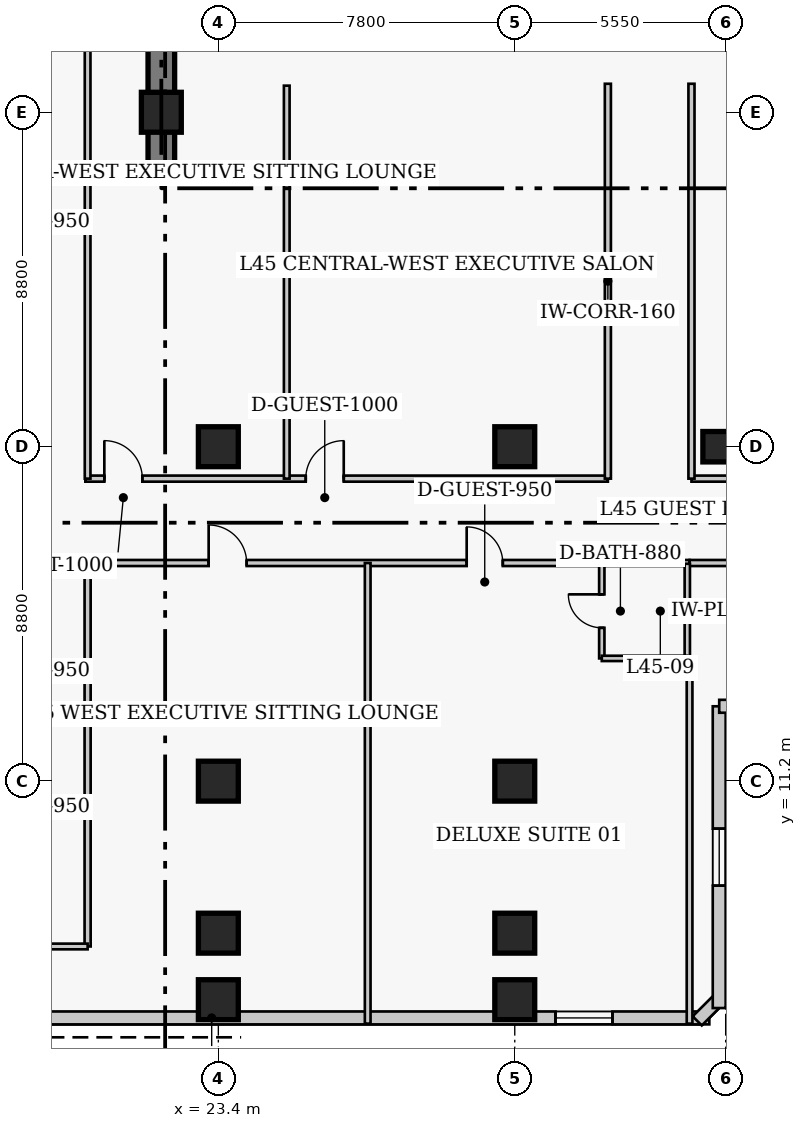
"""IFC4 building model, lengths in metres.
Left out: names, types, materials, properties, quantities, classifications, styles, units other than length and angle.
Written with IfcOpenShell. Run it as: python <this file> out.ifc"""

import sys

from ifc_helpers import new_model, si_unit, direction, frame, frame_2d, origin, origin_2d, place, context, subcontext, project, spatial, rectangle, extrude, element, fill, save


model = new_model("IFC4")
c1 = context("Model", 3, precision=1e-05, world=origin(), true_north=direction((0.0, 1.0)))
c2 = subcontext(c1, "Body", "Model", "MODEL_VIEW")
j1 = project(units=[si_unit("LENGTHUNIT", "METRE"), si_unit("PLANEANGLEUNIT", "RADIAN")], contexts=[c1])
p1 = place(None, origin())
s1 = spatial("IfcSite", under=j1, at=p1, CompositionType="ELEMENT")
p2 = place(p1, origin())
s2 = spatial("IfcBuilding", under=s1, at=p2, CompositionType="ELEMENT")
p3 = place(p2, frame((0.0, 0.0, 180.2)))
s3 = spatial("IfcBuildingStorey", under=s2, at=p3, CompositionType="ELEMENT", Elevation=180.2)
p4 = place(p3, frame((21.9, 27.05, 0.0), z_axis=(0.0, 0.0, 1.0), x_axis=(0.0, 1.0, 0.0)))
e1 = element("IfcWall", 1, at=p4, inside=s3, PredefinedType="SHEAR", context=c2, shape_type="SweptSolid", body=[
    extrude(rectangle(XDim=13.62, YDim=0.7, at=frame_2d((6.81, 0.0))), origin(), (0.0, 0.0, 1.0), 3.8),
])
for number, where, z_axis, x_axis in (
    (2, (23.4, 11.2, 0.0), (0.0, 0.0, 1.0), (1.0, 0.0, 0.0)),
    (3, (23.4, 20.0, 0.0), (0.0, 0.0, 1.0), (1.0, 0.0, 0.0)),
    (4, (31.2, 11.2, 0.0), (0.0, 0.0, 1.0), (1.0, 0.0, 0.0)),
    (5, (31.2, 20.0, 0.0), (0.0, 0.0, 1.0), (1.0, 0.0, 0.0)),
):
    element("IfcColumn", number, at=place(p3, frame(where, z_axis=z_axis, x_axis=x_axis)), inside=s3, PredefinedType="COLUMN", context=c2, shape_type="SweptSolid", body=[
        extrude(rectangle(XDim=1.05, YDim=1.05, at=origin_2d()), origin(), (0.0, 0.0, 1.0), 3.8),
    ])
p5 = place(p3, frame((36.75, 20.0, 0.0), z_axis=(0.0, 0.0, 1.0), x_axis=(1.0, 0.0, 0.0)))
e6 = element("IfcColumn", 6, at=p5, inside=s3, PredefinedType="COLUMN", context=c2, shape_type="SweptSolid", body=[
    extrude(rectangle(XDim=1.2, YDim=0.8, at=origin_2d()), origin(), (0.0, 0.0, 1.0), 3.8),
])
for number, where, z_axis, x_axis in (
    (7, (21.9, 28.8, 0.0), (0.0, 0.0, 1.0), (1.0, 0.0, 0.0)),
    (8, (23.4, 7.2, 0.0), (0.0, 0.0, 1.0), (1.0, 0.0, 0.0)),
    (9, (31.2, 7.2, 0.0), (0.0, 0.0, 1.0), (1.0, 0.0, 0.0)),
    (10, (23.4, 5.45, 0.0), (0.0, 0.0, 1.0), (1.0, 0.0, 0.0)),
    (11, (31.2, 5.45, 0.0), (0.0, 0.0, 1.0), (1.0, 0.0, 0.0)),
):
    element("IfcColumn", number, at=place(p3, frame(where, z_axis=z_axis, x_axis=x_axis)), inside=s3, PredefinedType="COLUMN", context=c2, shape_type="SweptSolid", body=[
        extrude(rectangle(XDim=1.05, YDim=1.05, at=origin_2d()), origin(), (0.0, 0.0, 1.0), 3.8),
    ])
p6 = place(p3, frame((9.63, 4.97, 0.0), z_axis=(0.0, 0.0, 1.0), x_axis=(1.0, 0.0, 0.0)))
e12 = element("IfcWall", 12, at=p6, inside=s3, PredefinedType="SOLIDWALL", context=c2, shape_type="SweptSolid", body=[
    extrude(rectangle(XDim=26.69, YDim=0.34, at=frame_2d((13.345, 0.0))), origin(), (0.0, 0.0, 1.0), 3.42),
])
p7 = place(p6, frame((3.048, 0.0, 0.85)))
e13 = element("IfcOpeningElement", 13, at=p7, cuts=e12, PredefinedType="OPENING", context=c2, shape_type="SweptSolid", body=[
    extrude(rectangle(XDim=1.5, YDim=1.75, at=frame_2d((0.75, 0.875))), frame((0.0, 0.18, 0.0), z_axis=(0.0, -1.0, 0.0), x_axis=(1.0, 0.0, 0.0)), (0.0, 0.0, 1.0), 0.36),
])
p8 = place(p6, frame((22.642, 0.0, 0.85)))
e14 = element("IfcOpeningElement", 14, at=p8, cuts=e12, PredefinedType="OPENING", context=c2, shape_type="SweptSolid", body=[
    extrude(rectangle(XDim=1.5, YDim=1.75, at=frame_2d((0.75, 0.875))), frame((0.0, 0.18, 0.0), z_axis=(0.0, -1.0, 0.0), x_axis=(1.0, 0.0, 0.0)), (0.0, 0.0, 1.0), 0.36),
])
p9 = place(p3, frame((36.001, 4.892, 0.0), z_axis=(0.0, 0.0, 1.0), x_axis=(0.707106781187, 0.707106781187, 0.0)))
e15 = element("IfcWall", 15, at=p9, inside=s3, PredefinedType="SOLIDWALL", context=c2, shape_type="SweptSolid", body=[
    extrude(rectangle(XDim=0.929, YDim=0.34, at=frame_2d((0.464, 0.0))), origin(), (0.0, 0.0, 1.0), 3.42),
])
p10 = place(p3, frame((36.58, 5.23, 0.0), z_axis=(0.0, 0.0, 1.0), x_axis=(0.0, 1.0, 0.0)))
e16 = element("IfcWall", 16, at=p10, inside=s3, PredefinedType="SOLIDWALL", context=c2, shape_type="SweptSolid", body=[
    extrude(rectangle(XDim=7.94, YDim=0.34, at=frame_2d((3.97, 0.0))), origin(), (0.0, 0.0, 1.0), 3.42),
])
p11 = place(p10, frame((3.22, 0.0, 0.85)))
e17 = element("IfcOpeningElement", 17, at=p11, cuts=e16, PredefinedType="OPENING", context=c2, shape_type="SweptSolid", body=[
    extrude(rectangle(XDim=1.5, YDim=1.75, at=frame_2d((0.75, 0.875))), frame((0.0, 0.18, 0.0), z_axis=(0.0, -1.0, 0.0), x_axis=(1.0, 0.0, 0.0)), (0.0, 0.0, 1.0), 0.36),
])
p12 = place(p3, frame((36.58, 13.17, 0.0), z_axis=(0.0, 0.0, 1.0), x_axis=(1.0, 0.0, 0.0)))
e18 = element("IfcWall", 18, at=p12, inside=s3, PredefinedType="SOLIDWALL", context=c2, shape_type="SweptSolid", body=[
    extrude(rectangle(XDim=4.84, YDim=0.34, at=frame_2d((2.42, 0.0))), origin(), (0.0, 0.0, 1.0), 3.42),
])
p13 = place(p12, frame((1.67, 0.0, 0.85)))
e19 = element("IfcOpeningElement", 19, at=p13, cuts=e18, PredefinedType="OPENING", context=c2, shape_type="SweptSolid", body=[
    extrude(rectangle(XDim=1.5, YDim=1.75, at=frame_2d((0.75, 0.875))), frame((0.0, 0.18, 0.0), z_axis=(0.0, -1.0, 0.0), x_axis=(1.0, 0.0, 0.0)), (0.0, 0.0, 1.0), 0.36),
])
p14 = place(p3, frame((19.9, 19.16, 0.0), z_axis=(0.0, 0.0, 1.0), x_axis=(1.0, 0.0, 0.0)))
e20 = element("IfcWall", 20, at=p14, inside=s3, PredefinedType="PARTITIONING", context=c2, shape_type="SweptSolid", body=[
    extrude(rectangle(XDim=13.75, YDim=0.16, at=frame_2d((6.875, 0.0))), origin(), (0.0, 0.0, 1.0), 3.42),
])
p15 = place(p14, frame((0.5, 0.0, 0.0)))
e21 = element("IfcOpeningElement", 21, at=p15, cuts=e20, PredefinedType="OPENING", context=c2, shape_type="SweptSolid", body=[
    extrude(rectangle(XDim=1.0, YDim=2.15, at=frame_2d((0.5, 1.075))), frame((0.0, 0.09, 0.0), z_axis=(0.0, -1.0, 0.0), x_axis=(1.0, 0.0, 0.0)), (0.0, 0.0, 1.0), 0.18),
])
p16 = place(p14, frame((5.8, 0.0, 0.0)))
e22 = element("IfcOpeningElement", 22, at=p16, cuts=e20, PredefinedType="OPENING", context=c2, shape_type="SweptSolid", body=[
    extrude(rectangle(XDim=1.0, YDim=2.15, at=frame_2d((0.5, 1.075))), frame((0.0, 0.09, 0.0), z_axis=(0.0, -1.0, 0.0), x_axis=(1.0, 0.0, 0.0)), (0.0, 0.0, 1.0), 0.18),
])
p17 = place(p3, frame((35.85, 19.16, 0.0), z_axis=(0.0, 0.0, 1.0), x_axis=(1.0, 0.0, 0.0)))
e23 = element("IfcWall", 23, at=p17, inside=s3, PredefinedType="PARTITIONING", context=c2, shape_type="SweptSolid", body=[
    extrude(rectangle(XDim=23.0, YDim=0.16, at=frame_2d((11.5, 0.0))), origin(), (0.0, 0.0, 1.0), 3.42),
])
p18 = place(p17, frame((7.231, 0.0, 0.0)))
e24 = element("IfcOpeningElement", 24, at=p18, cuts=e23, PredefinedType="OPENING", context=c2, shape_type="SweptSolid", body=[
    extrude(rectangle(XDim=1.0, YDim=2.15, at=frame_2d((0.5, 1.075))), frame((0.0, 0.09, 0.0), z_axis=(0.0, -1.0, 0.0), x_axis=(1.0, 0.0, 0.0)), (0.0, 0.0, 1.0), 0.18),
])
p19 = place(p17, frame((13.45, 0.0, 0.0)))
e25 = element("IfcOpeningElement", 25, at=p19, cuts=e23, PredefinedType="OPENING", context=c2, shape_type="SweptSolid", body=[
    extrude(rectangle(XDim=1.0, YDim=2.15, at=frame_2d((0.5, 1.075))), frame((0.0, 0.09, 0.0), z_axis=(0.0, -1.0, 0.0), x_axis=(1.0, 0.0, 0.0)), (0.0, 0.0, 1.0), 0.18),
])
for number, where, z_axis, x_axis in (
    (26, (33.65, 19.16, 0.0), (0.0, 0.0, 1.0), (0.0, 1.0, 0.0)),
    (27, (35.85, 19.16, 0.0), (0.0, 0.0, 1.0), (0.0, 1.0, 0.0)),
):
    element("IfcWall", number, at=place(p3, frame(where, z_axis=z_axis, x_axis=x_axis)), inside=s3, PredefinedType="PARTITIONING", context=c2, shape_type="SweptSolid", body=[
        extrude(rectangle(XDim=10.39, YDim=0.16, at=frame_2d((5.195, 0.0))), origin(), (0.0, 0.0, 1.0), 3.42),
    ])
p20 = place(p3, frame((19.9, 16.94, 0.0), z_axis=(0.0, 0.0, 1.0), x_axis=(1.0, 0.0, 0.0)))
e28 = element("IfcWall", 28, at=p20, inside=s3, PredefinedType="PARTITIONING", context=c2, shape_type="SweptSolid", body=[
    extrude(rectangle(XDim=15.9, YDim=0.16, at=frame_2d((7.95, 0.0))), origin(), (0.0, 0.0, 1.0), 3.42),
])
p21 = place(p20, frame((3.245, 0.0, 0.0)))
e29 = element("IfcOpeningElement", 29, at=p21, cuts=e28, PredefinedType="OPENING", context=c2, shape_type="SweptSolid", body=[
    extrude(rectangle(XDim=1.0, YDim=2.15, at=frame_2d((0.5, 1.075))), frame((0.0, 0.09, 0.0), z_axis=(0.0, -1.0, 0.0), x_axis=(1.0, 0.0, 0.0)), (0.0, 0.0, 1.0), 0.18),
])
p22 = place(p20, frame((10.035, 0.0, 0.0)))
e30 = element("IfcOpeningElement", 30, at=p22, cuts=e28, PredefinedType="OPENING", context=c2, shape_type="SweptSolid", body=[
    extrude(rectangle(XDim=0.95, YDim=2.1, at=frame_2d((0.475, 1.05))), frame((0.0, 0.09, 0.0), z_axis=(0.0, -1.0, 0.0), x_axis=(1.0, 0.0, 0.0)), (0.0, 0.0, 1.0), 0.18),
])
p23 = place(p3, frame((35.8, 16.94, 0.0), z_axis=(0.0, 0.0, 1.0), x_axis=(1.0, 0.0, 0.0)))
e31 = element("IfcWall", 31, at=p23, inside=s3, PredefinedType="PARTITIONING", context=c2, shape_type="SweptSolid", body=[
    extrude(rectangle(XDim=23.05, YDim=0.16, at=frame_2d((11.525, 0.0))), origin(), (0.0, 0.0, 1.0), 3.42),
])
p24 = place(p23, frame((7.222, 0.0, 0.0)))
e32 = element("IfcOpeningElement", 32, at=p24, cuts=e31, PredefinedType="OPENING", context=c2, shape_type="SweptSolid", body=[
    extrude(rectangle(XDim=1.0, YDim=2.15, at=frame_2d((0.5, 1.075))), frame((0.0, 0.09, 0.0), z_axis=(0.0, -1.0, 0.0), x_axis=(1.0, 0.0, 0.0)), (0.0, 0.0, 1.0), 0.18),
])
p25 = place(p23, frame((11.639, 0.0, 0.0)))
e33 = element("IfcOpeningElement", 33, at=p25, cuts=e31, PredefinedType="OPENING", context=c2, shape_type="SweptSolid", body=[
    extrude(rectangle(XDim=0.95, YDim=2.1, at=frame_2d((0.475, 1.05))), frame((0.0, 0.09, 0.0), z_axis=(0.0, -1.0, 0.0), x_axis=(1.0, 0.0, 0.0)), (0.0, 0.0, 1.0), 0.18),
])
p26 = place(p23, frame((17.936, 0.0, 0.0)))
e34 = element("IfcOpeningElement", 34, at=p26, cuts=e31, PredefinedType="OPENING", context=c2, shape_type="SweptSolid", body=[
    extrude(rectangle(XDim=0.95, YDim=2.1, at=frame_2d((0.475, 1.05))), frame((0.0, 0.09, 0.0), z_axis=(0.0, -1.0, 0.0), x_axis=(1.0, 0.0, 0.0)), (0.0, 0.0, 1.0), 0.18),
])
p27 = place(p3, frame((19.96, 6.85, 0.0), z_axis=(0.0, 0.0, 1.0), x_axis=(0.0, 1.0, 0.0)))
e35 = element("IfcWall", 35, at=p27, inside=s3, PredefinedType="PARTITIONING", context=c2, shape_type="SweptSolid", body=[
    extrude(rectangle(XDim=10.09, YDim=0.16, at=frame_2d((5.045, 0.0))), origin(), (0.0, 0.0, 1.0), 3.42),
])
p28 = place(p3, frame((17.74, 6.85, 0.0), z_axis=(0.0, 0.0, 1.0), x_axis=(1.0, 0.0, 0.0)))
e36 = element("IfcWall", 36, at=p28, inside=s3, PredefinedType="PARTITIONING", context=c2, shape_type="SweptSolid", body=[
    extrude(rectangle(XDim=2.22, YDim=0.15, at=frame_2d((1.11, 0.0))), origin(), (0.0, 0.0, 1.0), 3.42),
])
p29 = place(p3, frame((19.96, 19.16, 0.0), z_axis=(0.0, 0.0, 1.0), x_axis=(0.0, 1.0, 0.0)))
e37 = element("IfcWall", 37, at=p29, inside=s3, PredefinedType="PARTITIONING", context=c2, shape_type="SweptSolid", body=[
    extrude(rectangle(XDim=13.64, YDim=0.15, at=frame_2d((6.82, 0.0))), origin(), (0.0, 0.0, 1.0), 3.42),
])
p30 = place(p3, frame((25.2, 19.16, 0.0), z_axis=(0.0, 0.0, 1.0), x_axis=(0.0, 1.0, 0.0)))
e38 = element("IfcWall", 38, at=p30, inside=s3, PredefinedType="PARTITIONING", context=c2, shape_type="SweptSolid", body=[
    extrude(rectangle(XDim=10.34, YDim=0.15, at=frame_2d((5.17, 0.0))), origin(), (0.0, 0.0, 1.0), 3.42),
])
p31 = place(p3, frame((27.33, 4.82, 0.0), z_axis=(0.0, 0.0, 1.0), x_axis=(0.0, 1.0, 0.0)))
e39 = element("IfcWall", 39, at=p31, inside=s3, PredefinedType="PARTITIONING", context=c2, shape_type="SweptSolid", body=[
    extrude(rectangle(XDim=12.12, YDim=0.15, at=frame_2d((6.06, 0.0))), origin(), (0.0, 0.0, 1.0), 2.963),
])
p32 = place(p3, frame((33.49, 14.43, 0.0), z_axis=(0.0, 0.0, 1.0), x_axis=(0.0, 1.0, 0.0)))
e40 = element("IfcWall", 40, at=p32, inside=s3, PredefinedType="PLUMBINGWALL", context=c2, shape_type="SweptSolid", body=[
    extrude(rectangle(XDim=2.49, YDim=0.14, at=frame_2d((1.245, 0.0))), origin(), (0.0, 0.0, 1.0), 3.42),
])
p33 = place(p32, frame((0.805, 0.0, 0.0)))
e41 = element("IfcOpeningElement", 41, at=p33, cuts=e40, PredefinedType="OPENING", context=c2, shape_type="SweptSolid", body=[
    extrude(rectangle(XDim=0.88, YDim=2.05, at=frame_2d((0.44, 1.025))), frame((0.0, 0.08, 0.0), z_axis=(0.0, -1.0, 0.0), x_axis=(1.0, 0.0, 0.0)), (0.0, 0.0, 1.0), 0.16),
])
p34 = place(p3, frame((35.74, 14.43, 0.0), z_axis=(0.0, 0.0, 1.0), x_axis=(0.0, 1.0, 0.0)))
e42 = element("IfcWall", 42, at=p34, inside=s3, PredefinedType="PLUMBINGWALL", context=c2, shape_type="SweptSolid", body=[
    extrude(rectangle(XDim=2.49, YDim=0.14, at=frame_2d((1.245, 0.0))), origin(), (0.0, 0.0, 1.0), 3.42),
])
p35 = place(p3, frame((33.49, 14.43, 0.0), z_axis=(0.0, 0.0, 1.0), x_axis=(1.0, 0.0, 0.0)))
e43 = element("IfcWall", 43, at=p35, inside=s3, PredefinedType="PLUMBINGWALL", context=c2, shape_type="SweptSolid", body=[
    extrude(rectangle(XDim=2.25, YDim=0.14, at=frame_2d((1.125, 0.0))), origin(), (0.0, 0.0, 1.0), 3.42),
])
p36 = place(p3, frame((35.8, 4.82, 0.0), z_axis=(0.0, 0.0, 1.0), x_axis=(0.0, 1.0, 0.0)))
e44 = element("IfcWall", 44, at=p36, inside=s3, PredefinedType="PARTITIONING", context=c2, shape_type="SweptSolid", body=[
    extrude(rectangle(XDim=9.61, YDim=0.15, at=frame_2d((4.805, 0.0))), origin(), (0.0, 0.0, 1.0), 3.42),
])
p37 = place(p8, origin())
e45 = element("IfcWindow", 45, at=p37, inside=s3, PartitioningType="SINGLE_PANEL", PredefinedType="WINDOW", context=c2, shape_type="SweptSolid", body=[
    extrude(rectangle(XDim=1.5, YDim=1.75, at=frame_2d((0.75, 0.875))), frame((0.0, 0.03, 0.0), z_axis=(0.0, -1.0, 0.0), x_axis=(1.0, 0.0, 0.0)), (0.0, 0.0, 1.0), 0.06),
])
fill(e14, e45)
p38 = place(p11, origin())
e46 = element("IfcWindow", 46, at=p38, inside=s3, PartitioningType="SINGLE_PANEL", PredefinedType="WINDOW", context=c2, shape_type="SweptSolid", body=[
    extrude(rectangle(XDim=1.5, YDim=1.75, at=frame_2d((0.75, 0.875))), frame((0.0, 0.03, 0.0), z_axis=(0.0, -1.0, 0.0), x_axis=(1.0, 0.0, 0.0)), (0.0, 0.0, 1.0), 0.06),
])
fill(e17, e46)
p39 = place(p15, origin())
e47 = element("IfcDoor", 47, at=p39, inside=s3, OperationType="SINGLE_SWING_LEFT", PredefinedType="DOOR", context=c2, shape_type="SweptSolid", body=[
    extrude(rectangle(XDim=1.0, YDim=2.15, at=frame_2d((0.5, 1.075))), frame((0.0, 0.025, 0.0), z_axis=(0.0, -1.0, 0.0), x_axis=(1.0, 0.0, 0.0)), (0.0, 0.0, 1.0), 0.05),
])
fill(e21, e47)
p40 = place(p16, origin())
e48 = element("IfcDoor", 48, at=p40, inside=s3, OperationType="SINGLE_SWING_RIGHT", PredefinedType="DOOR", context=c2, shape_type="SweptSolid", body=[
    extrude(rectangle(XDim=1.0, YDim=2.15, at=frame_2d((0.5, 1.075))), frame((0.0, 0.025, 0.0), z_axis=(0.0, -1.0, 0.0), x_axis=(1.0, 0.0, 0.0)), (0.0, 0.0, 1.0), 0.05),
])
fill(e22, e48)
p41 = place(p21, origin())
e49 = element("IfcDoor", 49, at=p41, inside=s3, OperationType="SINGLE_SWING_LEFT", PredefinedType="DOOR", context=c2, shape_type="SweptSolid", body=[
    extrude(rectangle(XDim=1.0, YDim=2.15, at=frame_2d((0.5, 1.075))), frame((0.0, 0.025, 0.0), z_axis=(0.0, -1.0, 0.0), x_axis=(1.0, 0.0, 0.0)), (0.0, 0.0, 1.0), 0.05),
])
fill(e29, e49)
p42 = place(p33, origin())
e50 = element("IfcDoor", 50, at=p42, inside=s3, OperationType="SINGLE_SWING_RIGHT", PredefinedType="DOOR", context=c2, shape_type="SweptSolid", body=[
    extrude(rectangle(XDim=0.88, YDim=2.05, at=frame_2d((0.44, 1.025))), frame((0.0, 0.025, 0.0), z_axis=(0.0, -1.0, 0.0), x_axis=(1.0, 0.0, 0.0)), (0.0, 0.0, 1.0), 0.05),
])
fill(e41, e50)
p43 = place(p22, origin())
e51 = element("IfcDoor", 51, at=p43, inside=s3, OperationType="SINGLE_SWING_LEFT", PredefinedType="DOOR", context=c2, shape_type="SweptSolid", body=[
    extrude(rectangle(XDim=0.95, YDim=2.1, at=frame_2d((0.475, 1.05))), frame((0.0, 0.025, 0.0), z_axis=(0.0, -1.0, 0.0), x_axis=(1.0, 0.0, 0.0)), (0.0, 0.0, 1.0), 0.05),
])
fill(e30, e51)
save(model, sys.argv[1])
